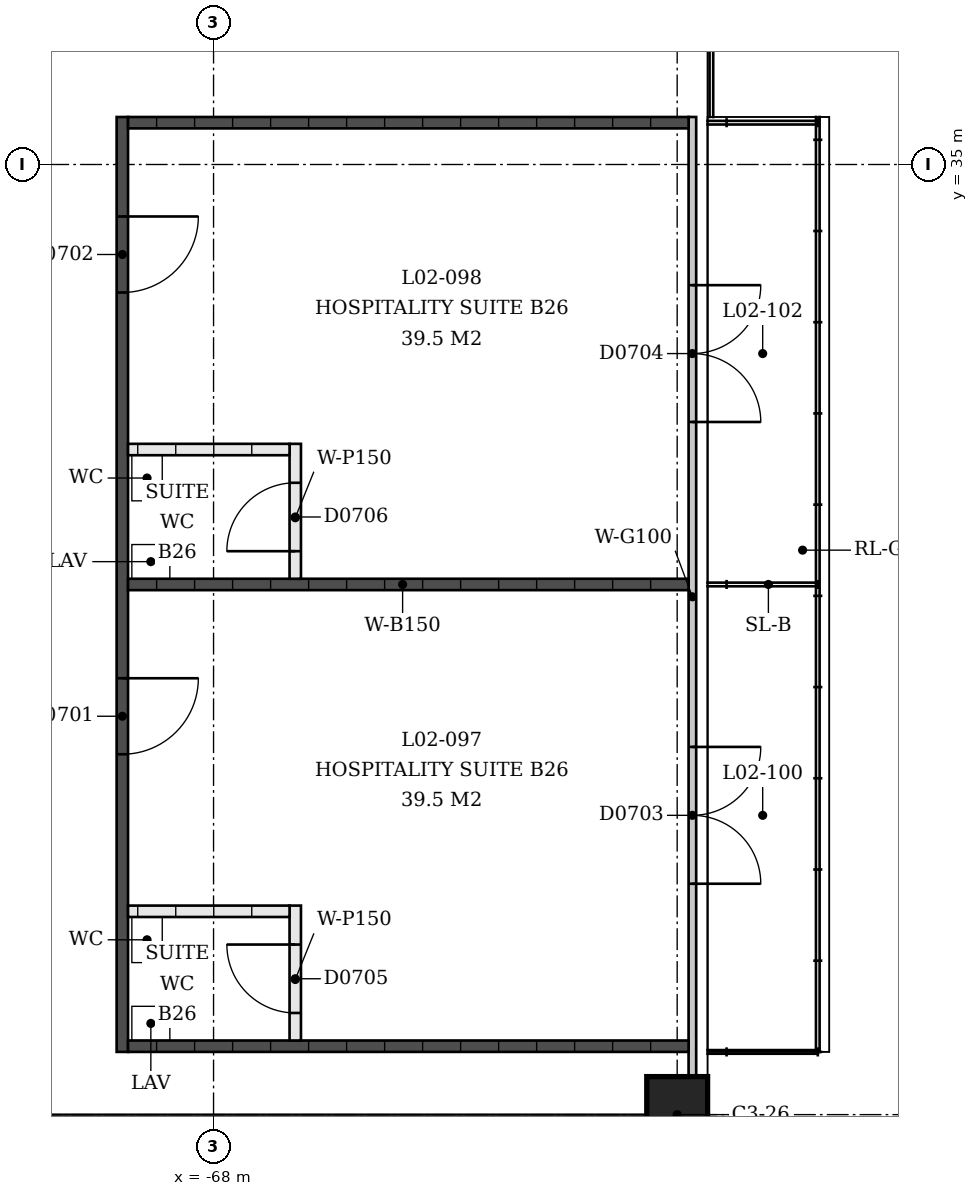
"""IFC4 building model, lengths in metres.
Left out: names, types, materials, properties, quantities, classifications, styles, units other than length and angle.
Written with IfcOpenShell. Run it as: python <this file> out.ifc"""

import sys

from ifc_helpers import new_model, si_unit, direction, frame, frame_2d, origin, origin_2d, place, context, subcontext, project, spatial, rectangle, extrude, element, fill, save


model = new_model("IFC4")
c1 = context("Model", 3, precision=1e-05, world=origin(), true_north=direction((0.0, 1.0)))
c2 = subcontext(c1, "Body", "Model", "MODEL_VIEW")
j1 = project(units=[si_unit("LENGTHUNIT", "METRE"), si_unit("PLANEANGLEUNIT", "RADIAN")], contexts=[c1])
p1 = place(None, origin())
s1 = spatial("IfcSite", under=j1, at=p1, CompositionType="ELEMENT")
p2 = place(p1, origin())
s2 = spatial("IfcBuilding", under=s1, at=p2, CompositionType="ELEMENT")
p3 = place(p2, frame((0.0, 0.0, 9.0)))
s3 = spatial("IfcBuildingStorey", under=s2, at=p3, CompositionType="ELEMENT", Elevation=9.0)
p4 = place(p3, frame((-61.9, 22.5, 0.0), z_axis=(0.0, 0.0, 1.0), x_axis=(0.0, -1.0, 0.0)))
e1 = element("IfcColumn", 1, at=p4, inside=s3, PredefinedType="COLUMN", context=c2, shape_type="SweptSolid", body=[
    extrude(rectangle(XDim=1.0, YDim=0.8, at=origin_2d()), origin(), (0.0, 0.0, 1.0), 4.5),
])
p5 = place(p3, frame((-61.7, 23.0, 0.0), z_axis=(0.0, 0.0, 1.0), x_axis=(0.0, 1.0, 0.0)))
e2 = element("IfcWall", 2, at=p5, inside=s3, PredefinedType="PARTITIONING", context=c2, shape_type="SweptSolid", body=[
    extrude(rectangle(XDim=12.625, YDim=0.1, at=frame_2d((6.312, 0.0))), origin(), (0.0, 0.0, 1.0), 3.0),
])
p6 = place(p5, frame((2.538, 0.0, 0.0)))
e3 = element("IfcOpeningElement", 3, at=p6, cuts=e2, PredefinedType="OPENING", context=c2, shape_type="SweptSolid", body=[
    extrude(rectangle(XDim=1.8, YDim=2.1, at=frame_2d((0.9, 1.05))), frame((0.0, 0.05, 0.0), z_axis=(0.0, -1.0, 0.0), x_axis=(1.0, 0.0, 0.0)), (0.0, 0.0, 1.0), 0.1),
])
p7 = place(p5, frame((8.613, 0.0, 0.0)))
e4 = element("IfcOpeningElement", 4, at=p7, cuts=e2, PredefinedType="OPENING", context=c2, shape_type="SweptSolid", body=[
    extrude(rectangle(XDim=1.8, YDim=2.1, at=frame_2d((0.9, 1.05))), frame((0.0, 0.05, 0.0), z_axis=(0.0, -1.0, 0.0), x_axis=(1.0, 0.0, 0.0)), (0.0, 0.0, 1.0), 0.1),
])
p8 = place(p3, frame((-69.2, 23.325, 0.0), z_axis=(0.0, 0.0, 1.0), x_axis=(0.0, 1.0, 0.0)))
e5 = element("IfcWall", 5, at=p8, inside=s3, PredefinedType="SOLIDWALL", context=c2, shape_type="SweptSolid", body=[
    extrude(rectangle(XDim=12.3, YDim=0.15, at=frame_2d((6.15, 0.0))), origin(), (0.0, 0.0, 1.0), 3.0),
])
p9 = place(p8, frame((3.916, 0.0, 0.0)))
e6 = element("IfcOpeningElement", 6, at=p9, cuts=e5, PredefinedType="OPENING", context=c2, shape_type="SweptSolid", body=[
    extrude(rectangle(XDim=1.0, YDim=2.1, at=frame_2d((0.5, 1.05))), frame((0.0, 0.075, 0.0), z_axis=(0.0, -1.0, 0.0), x_axis=(1.0, 0.0, 0.0)), (0.0, 0.0, 1.0), 0.15),
])
p10 = place(p8, frame((9.991, 0.0, 0.0)))
e7 = element("IfcOpeningElement", 7, at=p10, cuts=e5, PredefinedType="OPENING", context=c2, shape_type="SweptSolid", body=[
    extrude(rectangle(XDim=1.0, YDim=2.1, at=frame_2d((0.5, 1.05))), frame((0.0, 0.075, 0.0), z_axis=(0.0, -1.0, 0.0), x_axis=(1.0, 0.0, 0.0)), (0.0, 0.0, 1.0), 0.15),
])
for number, where, z_axis, x_axis in (
    (8, (-61.75, 23.4, 0.0), (0.0, 0.0, 1.0), (-1.0, 0.0, 0.0)),
    (9, (-61.75, 29.475, 0.0), (0.0, 0.0, 1.0), (-1.0, 0.0, 0.0)),
    (10, (-61.75, 35.55, 0.0), (0.0, 0.0, 1.0), (-1.0, 0.0, 0.0)),
):
    element("IfcWall", number, at=place(p3, frame(where, z_axis=z_axis, x_axis=x_axis)), inside=s3, PredefinedType="SOLIDWALL", context=c2, shape_type="SweptSolid", body=[
        extrude(rectangle(XDim=7.375, YDim=0.15, at=frame_2d((3.688, 0.0))), origin(), (0.0, 0.0, 1.0), 3.0),
    ])
p11 = place(p3, frame((-66.925, 23.475, 0.0), z_axis=(0.0, 0.0, 1.0), x_axis=(0.0, 1.0, 0.0)))
e11 = element("IfcWall", 11, at=p11, inside=s3, PredefinedType="PARTITIONING", context=c2, shape_type="SweptSolid", body=[
    extrude(rectangle(XDim=1.775, YDim=0.15, at=frame_2d((0.887, 0.0))), origin(), (0.0, 0.0, 1.0), 3.0),
])
p12 = place(p11, frame((0.363, 0.0, 0.0)))
e12 = element("IfcOpeningElement", 12, at=p12, cuts=e11, PredefinedType="OPENING", context=c2, shape_type="SweptSolid", body=[
    extrude(rectangle(XDim=0.9, YDim=2.1, at=frame_2d((0.45, 1.05))), frame((0.0, 0.075, 0.0), z_axis=(0.0, -1.0, 0.0), x_axis=(1.0, 0.0, 0.0)), (0.0, 0.0, 1.0), 0.15),
])
p13 = place(p3, frame((-67.0, 25.175, 0.0), z_axis=(0.0, 0.0, 1.0), x_axis=(-1.0, 0.0, 0.0)))
e13 = element("IfcWall", 13, at=p13, inside=s3, PredefinedType="PARTITIONING", context=c2, shape_type="SweptSolid", body=[
    extrude(rectangle(XDim=2.125, YDim=0.15, at=frame_2d((1.062, 0.0))), origin(), (0.0, 0.0, 1.0), 3.0),
])
p14 = place(p3, frame((-66.925, 29.55, 0.0), z_axis=(0.0, 0.0, 1.0), x_axis=(0.0, 1.0, 0.0)))
e14 = element("IfcWall", 14, at=p14, inside=s3, PredefinedType="PARTITIONING", context=c2, shape_type="SweptSolid", body=[
    extrude(rectangle(XDim=1.775, YDim=0.15, at=frame_2d((0.887, 0.0))), origin(), (0.0, 0.0, 1.0), 3.0),
])
p15 = place(p14, frame((0.363, 0.0, 0.0)))
e15 = element("IfcOpeningElement", 15, at=p15, cuts=e14, PredefinedType="OPENING", context=c2, shape_type="SweptSolid", body=[
    extrude(rectangle(XDim=0.9, YDim=2.1, at=frame_2d((0.45, 1.05))), frame((0.0, 0.075, 0.0), z_axis=(0.0, -1.0, 0.0), x_axis=(1.0, 0.0, 0.0)), (0.0, 0.0, 1.0), 0.15),
])
p16 = place(p3, frame((-67.0, 31.25, 0.0), z_axis=(0.0, 0.0, 1.0), x_axis=(-1.0, 0.0, 0.0)))
e16 = element("IfcWall", 16, at=p16, inside=s3, PredefinedType="PARTITIONING", context=c2, shape_type="SweptSolid", body=[
    extrude(rectangle(XDim=2.125, YDim=0.15, at=frame_2d((1.062, 0.0))), origin(), (0.0, 0.0, 1.0), 3.0),
])
p17 = place(p9, origin())
e17 = element("IfcDoor", 17, at=p17, inside=s3, OperationType="SINGLE_SWING_RIGHT", PredefinedType="DOOR", context=c2, shape_type="SweptSolid", body=[
    extrude(rectangle(XDim=1.0, YDim=2.1, at=frame_2d((0.5, 1.05))), frame((0.0, 0.025, 0.0), z_axis=(0.0, -1.0, 0.0), x_axis=(1.0, 0.0, 0.0)), (0.0, 0.0, 1.0), 0.05),
])
fill(e6, e17)
p18 = place(p10, origin())
e18 = element("IfcDoor", 18, at=p18, inside=s3, OperationType="SINGLE_SWING_RIGHT", PredefinedType="DOOR", context=c2, shape_type="SweptSolid", body=[
    extrude(rectangle(XDim=1.0, YDim=2.1, at=frame_2d((0.5, 1.05))), frame((0.0, 0.025, 0.0), z_axis=(0.0, -1.0, 0.0), x_axis=(1.0, 0.0, 0.0)), (0.0, 0.0, 1.0), 0.05),
])
fill(e7, e18)
p19 = place(p6, origin())
e19 = element("IfcDoor", 19, at=p19, inside=s3, OperationType="DOUBLE_DOOR_SINGLE_SWING", PredefinedType="DOOR", context=c2, shape_type="SweptSolid", body=[
    extrude(rectangle(XDim=1.8, YDim=2.1, at=frame_2d((0.9, 1.05))), frame((0.0, 0.025, 0.0), z_axis=(0.0, -1.0, 0.0), x_axis=(1.0, 0.0, 0.0)), (0.0, 0.0, 1.0), 0.05),
])
fill(e3, e19)
p20 = place(p7, origin())
e20 = element("IfcDoor", 20, at=p20, inside=s3, OperationType="DOUBLE_DOOR_SINGLE_SWING", PredefinedType="DOOR", context=c2, shape_type="SweptSolid", body=[
    extrude(rectangle(XDim=1.8, YDim=2.1, at=frame_2d((0.9, 1.05))), frame((0.0, 0.025, 0.0), z_axis=(0.0, -1.0, 0.0), x_axis=(1.0, 0.0, 0.0)), (0.0, 0.0, 1.0), 0.05),
])
fill(e4, e20)
p21 = place(p12, origin())
e21 = element("IfcDoor", 21, at=p21, inside=s3, OperationType="SINGLE_SWING_LEFT", PredefinedType="DOOR", context=c2, shape_type="SweptSolid", body=[
    extrude(rectangle(XDim=0.9, YDim=2.1, at=frame_2d((0.45, 1.05))), frame((0.0, 0.025, 0.0), z_axis=(0.0, -1.0, 0.0), x_axis=(1.0, 0.0, 0.0)), (0.0, 0.0, 1.0), 0.05),
])
fill(e12, e21)
p22 = place(p15, origin())
e22 = element("IfcDoor", 22, at=p22, inside=s3, OperationType="SINGLE_SWING_RIGHT", PredefinedType="DOOR", context=c2, shape_type="SweptSolid", body=[
    extrude(rectangle(XDim=0.9, YDim=2.1, at=frame_2d((0.45, 1.05))), frame((0.0, 0.025, 0.0), z_axis=(0.0, -1.0, 0.0), x_axis=(1.0, 0.0, 0.0)), (0.0, 0.0, 1.0), 0.05),
])
fill(e15, e22)
save(model, sys.argv[1])
